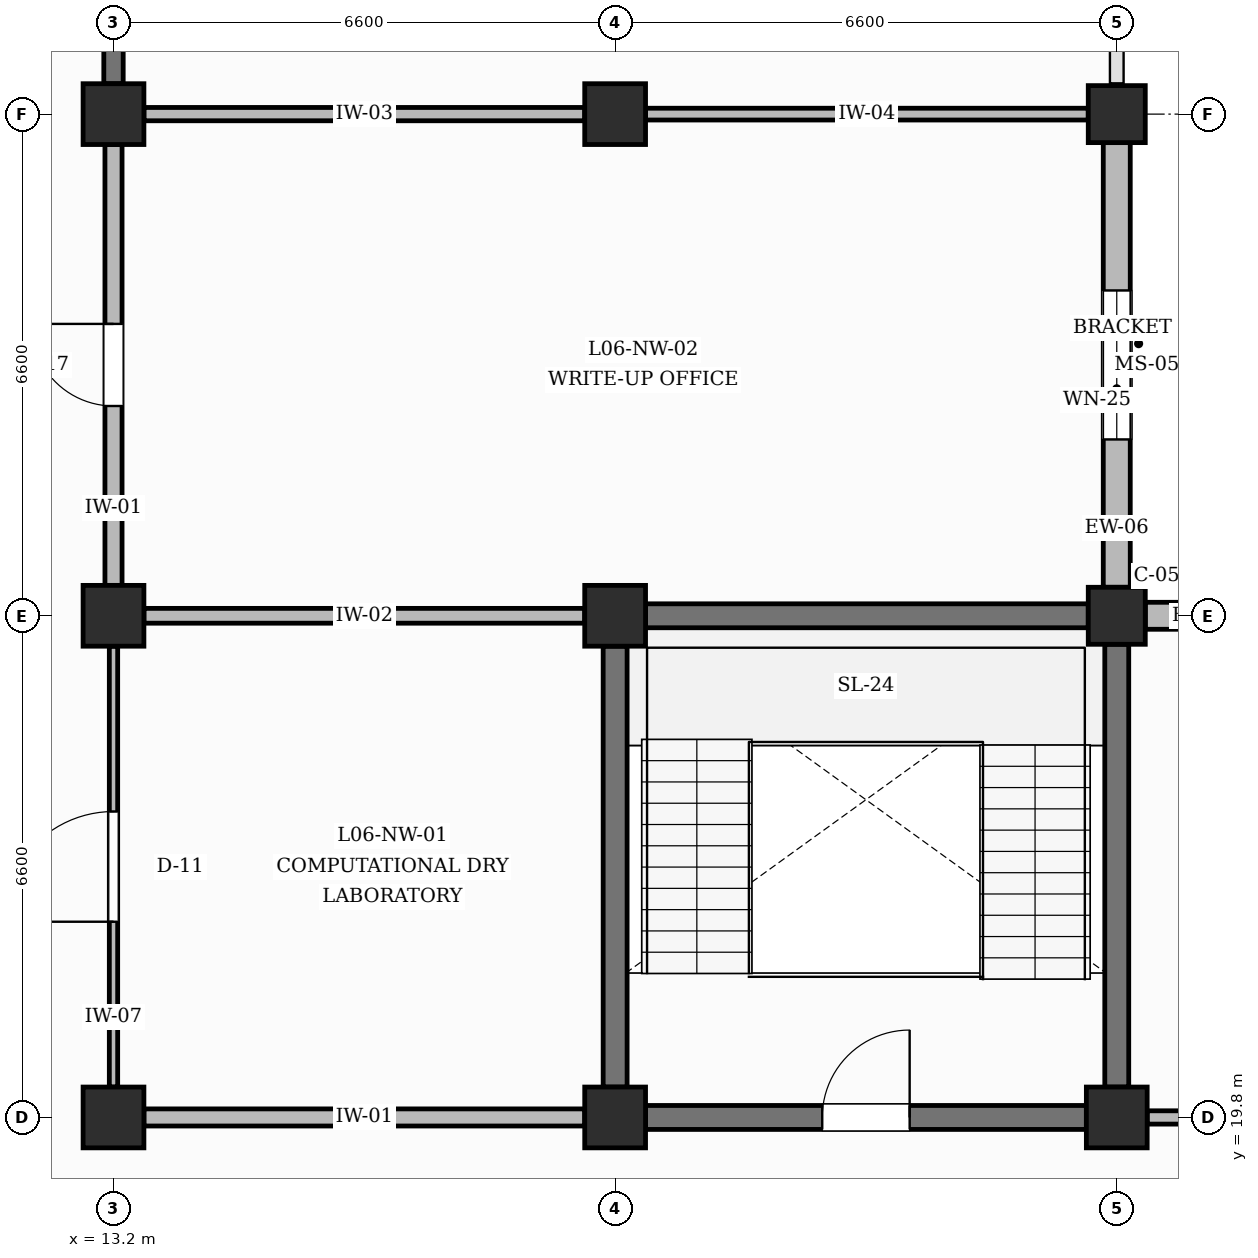
"""IFC4 building model, lengths in metres.
Left out: names, types, materials, properties, quantities, classifications, styles, units other than length and angle.
Written with IfcOpenShell. Run it as: python <this file> out.ifc"""

import sys

from ifc_helpers import new_model, si_unit, direction, frame, frame_2d, origin, origin_2d, place, context, subcontext, project, spatial, rectangle, extrude, element, fill, save


model = new_model("IFC4")
c1 = context("Model", 3, precision=1e-05, world=origin(), true_north=direction((0.0, 1.0)))
c2 = subcontext(c1, "Body", "Model", "MODEL_VIEW")
j1 = project(units=[si_unit("LENGTHUNIT", "METRE"), si_unit("PLANEANGLEUNIT", "RADIAN")], contexts=[c1])
p1 = place(None, origin())
s1 = spatial("IfcSite", under=j1, at=p1, CompositionType="ELEMENT")
p2 = place(p1, origin())
s2 = spatial("IfcBuilding", under=s1, at=p2, CompositionType="ELEMENT")
p3 = place(p2, frame((0.0, 0.0, 27.0)))
s3 = spatial("IfcBuildingStorey", under=s2, at=p3, CompositionType="ELEMENT", Elevation=27.0)
for number, where, z_axis, x_axis in (
    (1, (13.2, 19.8, 0.0), (0.0, 0.0, 1.0), (1.0, 0.0, 0.0)),
    (2, (13.2, 26.4, 0.0), (0.0, 0.0, 1.0), (1.0, 0.0, 0.0)),
    (3, (13.2, 33.0, 0.0), (0.0, 0.0, 1.0), (1.0, 0.0, 0.0)),
    (4, (19.8, 19.8, 0.0), (0.0, 0.0, 1.0), (1.0, 0.0, 0.0)),
    (5, (19.8, 26.4, 0.0), (0.0, 0.0, 1.0), (1.0, 0.0, 0.0)),
    (6, (19.8, 33.0, 0.0), (0.0, 0.0, 1.0), (1.0, 0.0, 0.0)),
    (7, (26.4, 19.8, 0.0), (0.0, 0.0, 1.0), (1.0, 0.0, 0.0)),
):
    element("IfcColumn", number, at=place(p3, frame(where, z_axis=z_axis, x_axis=x_axis)), inside=s3, PredefinedType="COLUMN", context=c2, shape_type="SweptSolid", body=[
        extrude(rectangle(XDim=0.8, YDim=0.8, at=origin_2d()), origin(), (0.0, 0.0, 1.0), 4.2),
    ])
for number, where, z_axis, x_axis in (
    (8, (26.4, 26.4, 0.0), (0.0, 0.0, 1.0), (1.0, 0.0, 0.0)),
    (9, (26.4, 33.0, 0.0), (0.0, 0.0, 1.0), (1.0, 0.0, 0.0)),
):
    element("IfcColumn", number, at=place(p3, frame(where, z_axis=z_axis, x_axis=x_axis)), inside=s3, PredefinedType="COLUMN", context=c2, shape_type="SweptSolid", body=[
        extrude(rectangle(XDim=0.75, YDim=0.75, at=origin_2d()), origin(), (0.0, 0.0, 1.0), 4.2),
    ])
p4 = place(p3, frame((26.4, 26.775, 0.0), z_axis=(0.0, 0.0, 1.0), x_axis=(0.0, 1.0, 0.0)))
e10 = element("IfcWall", 10, at=p4, inside=s3, PredefinedType="SOLIDWALL", context=c2, shape_type="SweptSolid", body=[
    extrude(rectangle(XDim=5.85, YDim=0.355, at=frame_2d((2.925, 0.0))), origin(), (0.0, 0.0, 1.0), 3.27),
])
p5 = place(p4, frame((1.945, 0.0, 0.95)))
e11 = element("IfcOpeningElement", 11, at=p5, cuts=e10, PredefinedType="OPENING", context=c2, shape_type="SweptSolid", body=[
    extrude(rectangle(XDim=1.96, YDim=1.3, at=frame_2d((0.98, 0.65))), frame((0.0, 0.188, 0.0), z_axis=(0.0, -1.0, 0.0), x_axis=(1.0, 0.0, 0.0)), (0.0, 0.0, 1.0), 0.375),
])
p6 = place(p3, frame((26.775, 26.4, 0.0), z_axis=(0.0, 0.0, 1.0), x_axis=(1.0, 0.0, 0.0)))
e12 = element("IfcWall", 12, at=p6, inside=s3, PredefinedType="SOLIDWALL", context=c2, shape_type="SweptSolid", body=[
    extrude(rectangle(XDim=5.85, YDim=0.355, at=frame_2d((2.925, 0.0))), origin(), (0.0, 0.0, 1.0), 3.27),
])
p7 = place(p6, frame((1.945, 0.0, 0.95)))
e13 = element("IfcOpeningElement", 13, at=p7, cuts=e12, PredefinedType="OPENING", context=c2, shape_type="SweptSolid", body=[
    extrude(rectangle(XDim=1.96, YDim=1.96, at=frame_2d((0.98, 0.98))), frame((0.0, 0.188, 0.0), z_axis=(0.0, -1.0, 0.0), x_axis=(1.0, 0.0, 0.0)), (0.0, 0.0, 1.0), 0.375),
])
p8 = place(p3, frame((20.2, 19.8, 0.0), z_axis=(0.0, 0.0, 1.0), x_axis=(1.0, 0.0, 0.0)))
e14 = element("IfcWall", 14, at=p8, inside=s3, PredefinedType="SHEAR", context=c2, shape_type="SweptSolid", body=[
    extrude(rectangle(XDim=5.8, YDim=0.315, at=frame_2d((2.9, 0.0))), origin(), (0.0, 0.0, 1.0), 3.17),
])
p9 = place(p8, frame((2.325, 0.0, 0.0)))
e15 = element("IfcOpeningElement", 15, at=p9, cuts=e14, PredefinedType="OPENING", context=c2, shape_type="SweptSolid", body=[
    extrude(rectangle(XDim=1.15, YDim=2.2, at=frame_2d((0.575, 1.1))), frame((0.0, 0.167, 0.0), z_axis=(0.0, -1.0, 0.0), x_axis=(1.0, 0.0, 0.0)), (0.0, 0.0, 1.0), 0.335),
])
p10 = place(p3, frame((20.2, 26.4, 0.0), z_axis=(0.0, 0.0, 1.0), x_axis=(1.0, 0.0, 0.0)))
e16 = element("IfcWall", 16, at=p10, inside=s3, PredefinedType="SHEAR", context=c2, shape_type="SweptSolid", body=[
    extrude(rectangle(XDim=5.825, YDim=0.315, at=frame_2d((2.913, 0.0))), origin(), (0.0, 0.0, 1.0), 3.17),
])
p11 = place(p3, frame((19.8, 20.2, 0.0), z_axis=(0.0, 0.0, 1.0), x_axis=(0.0, 1.0, 0.0)))
e17 = element("IfcWall", 17, at=p11, inside=s3, PredefinedType="SHEAR", context=c2, shape_type="SweptSolid", body=[
    extrude(rectangle(XDim=5.8, YDim=0.315, at=frame_2d((2.9, 0.0))), origin(), (0.0, 0.0, 1.0), 3.17),
])
p12 = place(p3, frame((26.4, 20.2, 0.0), z_axis=(0.0, 0.0, 1.0), x_axis=(0.0, 1.0, 0.0)))
e18 = element("IfcWall", 18, at=p12, inside=s3, PredefinedType="SHEAR", context=c2, shape_type="SweptSolid", body=[
    extrude(rectangle(XDim=5.825, YDim=0.315, at=frame_2d((2.913, 0.0))), origin(), (0.0, 0.0, 1.0), 3.17),
])
p13 = place(p3, frame((13.2, 20.2, 0.0), z_axis=(0.0, 0.0, 1.0), x_axis=(0.0, 1.0, 0.0)))
e19 = element("IfcWall", 19, at=p13, inside=s3, PredefinedType="PARTITIONING", context=c2, shape_type="SweptSolid", body=[
    extrude(rectangle(XDim=5.8, YDim=0.11, at=frame_2d((2.9, 0.0))), origin(), (0.0, 0.0, 1.0), 3.17),
])
p14 = place(p13, frame((2.175, 0.0, 0.0)))
e20 = element("IfcOpeningElement", 20, at=p14, cuts=e19, PredefinedType="OPENING", context=c2, shape_type="SweptSolid", body=[
    extrude(rectangle(XDim=1.45, YDim=2.25, at=frame_2d((0.725, 1.125))), frame((0.0, 0.065, 0.0), z_axis=(0.0, -1.0, 0.0), x_axis=(1.0, 0.0, 0.0)), (0.0, 0.0, 1.0), 0.13),
])
p15 = place(p3, frame((13.2, 26.8, 0.0), z_axis=(0.0, 0.0, 1.0), x_axis=(0.0, 1.0, 0.0)))
e21 = element("IfcWall", 21, at=p15, inside=s3, PredefinedType="PARTITIONING", context=c2, shape_type="SweptSolid", body=[
    extrude(rectangle(XDim=5.8, YDim=0.225, at=frame_2d((2.9, 0.0))), origin(), (0.0, 0.0, 1.0), 3.17),
])
p16 = place(p15, frame((2.36, 0.0, 0.0)))
e22 = element("IfcOpeningElement", 22, at=p16, cuts=e21, PredefinedType="OPENING", context=c2, shape_type="SweptSolid", body=[
    extrude(rectangle(XDim=1.08, YDim=2.15, at=frame_2d((0.54, 1.075))), frame((0.0, 0.123, 0.0), z_axis=(0.0, -1.0, 0.0), x_axis=(1.0, 0.0, 0.0)), (0.0, 0.0, 1.0), 0.245),
])
p17 = place(p3, frame((13.2, 33.4, 0.0), z_axis=(0.0, 0.0, 1.0), x_axis=(0.0, 1.0, 0.0)))
e23 = element("IfcWall", 23, at=p17, inside=s3, PredefinedType="SHEAR", context=c2, shape_type="SweptSolid", body=[
    extrude(rectangle(XDim=5.8, YDim=0.255, at=frame_2d((2.9, 0.0))), origin(), (0.0, 0.0, 1.0), 3.17),
])
p18 = place(p17, frame((2.225, 0.0, 0.0)))
e24 = element("IfcOpeningElement", 24, at=p18, cuts=e23, PredefinedType="OPENING", context=c2, shape_type="SweptSolid", body=[
    extrude(rectangle(XDim=1.35, YDim=2.3, at=frame_2d((0.675, 1.15))), frame((0.0, 0.137, 0.0), z_axis=(0.0, -1.0, 0.0), x_axis=(1.0, 0.0, 0.0)), (0.0, 0.0, 1.0), 0.275),
])
p19 = place(p3, frame((13.6, 19.8, 0.0), z_axis=(0.0, 0.0, 1.0), x_axis=(1.0, 0.0, 0.0)))
e25 = element("IfcWall", 25, at=p19, inside=s3, PredefinedType="PARTITIONING", context=c2, shape_type="SweptSolid", body=[
    extrude(rectangle(XDim=5.8, YDim=0.225, at=frame_2d((2.9, 0.0))), origin(), (0.0, 0.0, 1.0), 3.17),
])
p20 = place(p3, frame((13.6, 26.4, 0.0), z_axis=(0.0, 0.0, 1.0), x_axis=(1.0, 0.0, 0.0)))
e26 = element("IfcWall", 26, at=p20, inside=s3, PredefinedType="PARTITIONING", context=c2, shape_type="SweptSolid", body=[
    extrude(rectangle(XDim=5.8, YDim=0.195, at=frame_2d((2.9, 0.0))), origin(), (0.0, 0.0, 1.0), 3.17),
])
p21 = place(p3, frame((13.6, 33.0, 0.0), z_axis=(0.0, 0.0, 1.0), x_axis=(1.0, 0.0, 0.0)))
e27 = element("IfcWall", 27, at=p21, inside=s3, PredefinedType="PARTITIONING", context=c2, shape_type="SweptSolid", body=[
    extrude(rectangle(XDim=5.8, YDim=0.175, at=frame_2d((2.9, 0.0))), origin(), (0.0, 0.0, 1.0), 3.17),
])
p22 = place(p3, frame((20.2, 33.0, 0.0), z_axis=(0.0, 0.0, 1.0), x_axis=(1.0, 0.0, 0.0)))
e28 = element("IfcWall", 28, at=p22, inside=s3, PredefinedType="PARTITIONING", context=c2, shape_type="SweptSolid", body=[
    extrude(rectangle(XDim=5.825, YDim=0.155, at=frame_2d((2.913, 0.0))), origin(), (0.0, 0.0, 1.0), 3.17),
])
p23 = place(p3, frame((26.8, 19.8, 0.0), z_axis=(0.0, 0.0, 1.0), x_axis=(1.0, 0.0, 0.0)))
e29 = element("IfcWall", 29, at=p23, inside=s3, PredefinedType="PARTITIONING", context=c2, shape_type="SweptSolid", body=[
    extrude(rectangle(XDim=5.8, YDim=0.175, at=frame_2d((2.9, 0.0))), origin(), (0.0, 0.0, 1.0), 3.17),
])
p24 = place(p23, frame((2.34, 0.0, 0.0)))
e30 = element("IfcOpeningElement", 30, at=p24, cuts=e29, PredefinedType="OPENING", context=c2, shape_type="SweptSolid", body=[
    extrude(rectangle(XDim=1.12, YDim=2.2, at=frame_2d((0.56, 1.1))), frame((0.0, 0.097, 0.0), z_axis=(0.0, -1.0, 0.0), x_axis=(1.0, 0.0, 0.0)), (0.0, 0.0, 1.0), 0.195),
])
p25 = place(p5, origin())
e31 = element("IfcWindow", 31, at=p25, inside=s3, PartitioningType="DOUBLE_PANEL_VERTICAL", PredefinedType="WINDOW", context=c2, shape_type="SweptSolid", body=[
    extrude(rectangle(XDim=1.96, YDim=1.3, at=frame_2d((0.98, 0.65))), frame((0.0, 0.03, 0.0), z_axis=(0.0, -1.0, 0.0), x_axis=(1.0, 0.0, 0.0)), (0.0, 0.0, 1.0), 0.06),
])
fill(e11, e31)
p26 = place(p9, origin())
e32 = element("IfcDoor", 32, at=p26, inside=s3, OperationType="SINGLE_SWING_RIGHT", PredefinedType="DOOR", context=c2, shape_type="SweptSolid", body=[
    extrude(rectangle(XDim=1.15, YDim=2.2, at=frame_2d((0.575, 1.1))), frame((0.0, 0.025, 0.0), z_axis=(0.0, -1.0, 0.0), x_axis=(1.0, 0.0, 0.0)), (0.0, 0.0, 1.0), 0.05),
])
fill(e15, e32)
p27 = place(p14, origin())
e33 = element("IfcDoor", 33, at=p27, inside=s3, OperationType="SINGLE_SWING_LEFT", PredefinedType="DOOR", context=c2, shape_type="SweptSolid", body=[
    extrude(rectangle(XDim=1.45, YDim=2.25, at=frame_2d((0.725, 1.125))), frame((0.0, 0.025, 0.0), z_axis=(0.0, -1.0, 0.0), x_axis=(1.0, 0.0, 0.0)), (0.0, 0.0, 1.0), 0.05),
])
fill(e20, e33)
p28 = place(p16, origin())
e34 = element("IfcDoor", 34, at=p28, inside=s3, OperationType="SINGLE_SWING_RIGHT", PredefinedType="DOOR", context=c2, shape_type="SweptSolid", body=[
    extrude(rectangle(XDim=1.08, YDim=2.15, at=frame_2d((0.54, 1.075))), frame((0.0, 0.025, 0.0), z_axis=(0.0, -1.0, 0.0), x_axis=(1.0, 0.0, 0.0)), (0.0, 0.0, 1.0), 0.05),
])
fill(e22, e34)
save(model, sys.argv[1])
